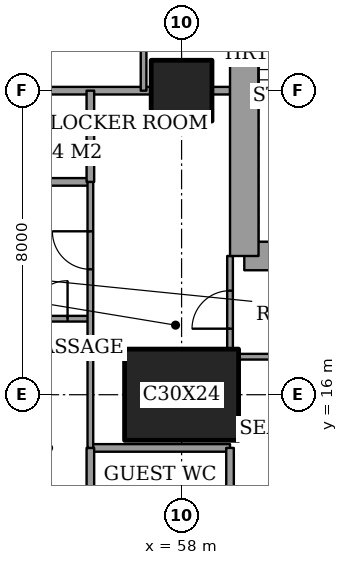
"""IFC4 building model, lengths in metres.
Left out: names, types, materials, properties, quantities, classifications, styles, units other than length and angle.
Written with IfcOpenShell. Run it as: python <this file> out.ifc"""

import sys

from ifc_helpers import new_model, si_unit, direction, frame, frame_2d, origin, origin_2d, place, context, subcontext, project, spatial, rectangle, extrude, element, fill, save


model = new_model("IFC4")
c1 = context("Model", 3, precision=1e-05, world=origin(), true_north=direction((0.0, 1.0)))
c2 = subcontext(c1, "Body", "Model", "MODEL_VIEW")
j1 = project(units=[si_unit("LENGTHUNIT", "METRE"), si_unit("PLANEANGLEUNIT", "RADIAN")], contexts=[c1])
p1 = place(None, origin())
s1 = spatial("IfcSite", under=j1, at=p1, CompositionType="ELEMENT")
p2 = place(p1, origin())
s2 = spatial("IfcBuilding", under=s1, at=p2, CompositionType="ELEMENT")
p3 = place(p2, frame((0.0, 0.0, 252.0)))
s3 = spatial("IfcBuildingStorey", under=s2, at=p3, CompositionType="ELEMENT", Elevation=252.0)
p4 = place(p3, frame((58.0, 16.0, 0.0), z_axis=(0.0, 0.0, 1.0), x_axis=(1.0, 0.0, 0.0)))
e1 = element("IfcColumn", 1, at=p4, inside=s3, PredefinedType="COLUMN", context=c2, shape_type="SweptSolid", body=[
    extrude(rectangle(XDim=3.0, YDim=2.4, at=origin_2d()), origin(), (0.0, 0.0, 1.0), 3.6),
])
p5 = place(p3, frame((58.0, 24.0, 0.0), z_axis=(0.0, 0.0, 1.0), x_axis=(1.0, 0.0, 0.0)))
e2 = element("IfcColumn", 2, at=p5, inside=s3, PredefinedType="COLUMN", context=c2, shape_type="SweptSolid", body=[
    extrude(rectangle(XDim=1.6, YDim=1.6, at=origin_2d()), origin(), (0.0, 0.0, 1.0), 3.6),
])
p6 = place(p3, frame((59.65, 19.65, 0.0), z_axis=(0.0, 0.0, 1.0), x_axis=(1.0, 0.0, 0.0)))
e3 = element("IfcWall", 3, at=p6, inside=s3, PredefinedType="SHEAR", context=c2, shape_type="SweptSolid", body=[
    extrude(rectangle(XDim=4.45, YDim=0.75, at=frame_2d((2.225, 0.0))), origin(), (0.0, 0.0, 1.0), 3.6),
])
p7 = place(p3, frame((59.65, 28.35, 0.0), z_axis=(0.0, 0.0, 1.0), x_axis=(0.0, -1.0, 0.0)))
e4 = element("IfcWall", 4, at=p7, inside=s3, PredefinedType="SHEAR", context=c2, shape_type="SweptSolid", body=[
    extrude(rectangle(XDim=8.7, YDim=0.75, at=frame_2d((4.35, 0.0))), origin(), (0.0, 0.0, 1.0), 3.6),
])
p8 = place(p7, frame((0.975, 0.0, 0.0)))
e5 = element("IfcOpeningElement", 5, at=p8, cuts=e4, PredefinedType="OPENING", context=c2, shape_type="SweptSolid", body=[
    extrude(rectangle(XDim=1.0, YDim=2.1, at=frame_2d((0.5, 1.05))), frame((0.0, 0.385, 0.0), z_axis=(0.0, -1.0, 0.0), x_axis=(1.0, 0.0, 0.0)), (0.0, 0.0, 1.0), 0.77),
])
p9 = place(p3, frame((55.6, 14.6, 0.0), z_axis=(0.0, 0.0, 1.0), x_axis=(1.0, 0.0, 0.0)))
e6 = element("IfcWall", 6, at=p9, inside=s3, PredefinedType="PARTITIONING", context=c2, shape_type="SweptSolid", body=[
    extrude(rectangle(XDim=3.675, YDim=0.2, at=frame_2d((1.837, 0.0))), origin(), (0.0, 0.0, 1.0), 3.35),
])
p10 = place(p3, frame((59.5, 17.0, 0.0), z_axis=(0.0, 0.0, 1.0), x_axis=(1.0, 0.0, 0.0)))
e7 = element("IfcWall", 7, at=p10, inside=s3, PredefinedType="PARTITIONING", context=c2, shape_type="SweptSolid", body=[
    extrude(rectangle(XDim=6.95, YDim=0.15, at=frame_2d((3.475, 0.0))), origin(), (0.0, 0.0, 1.0), 3.35),
])
p11 = place(p3, frame((51.6, 18.0, 0.0), z_axis=(0.0, 0.0, 1.0), x_axis=(1.0, 0.0, 0.0)))
e8 = element("IfcWall", 8, at=p11, inside=s3, PredefinedType="PARTITIONING", context=c2, shape_type="SweptSolid", body=[
    extrude(rectangle(XDim=4.0, YDim=0.15, at=frame_2d((2.0, 0.0))), origin(), (0.0, 0.0, 1.0), 3.35),
])
p12 = place(p11, frame((2.4, 0.0, 0.0)))
e9 = element("IfcOpeningElement", 9, at=p12, cuts=e8, PredefinedType="OPENING", context=c2, shape_type="SweptSolid", body=[
    extrude(rectangle(XDim=1.0, YDim=2.1, at=frame_2d((0.5, 1.05))), frame((0.0, 0.085, 0.0), z_axis=(0.0, -1.0, 0.0), x_axis=(1.0, 0.0, 0.0)), (0.0, 0.0, 1.0), 0.17),
])
p13 = place(p3, frame((51.2, 21.6, 0.0), z_axis=(0.0, 0.0, 1.0), x_axis=(1.0, 0.0, 0.0)))
e10 = element("IfcWall", 10, at=p13, inside=s3, PredefinedType="PARTITIONING", context=c2, shape_type="SweptSolid", body=[
    extrude(rectangle(XDim=4.4, YDim=0.2, at=frame_2d((2.2, 0.0))), origin(), (0.0, 0.0, 1.0), 3.35),
])
p14 = place(p13, frame((1.75, 0.0, 0.0)))
e11 = element("IfcOpeningElement", 11, at=p14, cuts=e10, PredefinedType="OPENING", context=c2, shape_type="SweptSolid", body=[
    extrude(rectangle(XDim=0.9, YDim=2.1, at=frame_2d((0.45, 1.05))), frame((0.0, 0.11, 0.0), z_axis=(0.0, -1.0, 0.0), x_axis=(1.0, 0.0, 0.0)), (0.0, 0.0, 1.0), 0.22),
])
p15 = place(p3, frame((50.8, 24.0, 0.0), z_axis=(0.0, 0.0, 1.0), x_axis=(1.0, 0.0, 0.0)))
e12 = element("IfcWall", 12, at=p15, inside=s3, PredefinedType="PARTITIONING", context=c2, shape_type="SweptSolid", body=[
    extrude(rectangle(XDim=6.4, YDim=0.2, at=frame_2d((3.2, 0.0))), origin(), (0.0, 0.0, 1.0), 3.35),
])
p16 = place(p3, frame((58.8, 24.0, 0.0), z_axis=(0.0, 0.0, 1.0), x_axis=(1.0, 0.0, 0.0)))
e13 = element("IfcWall", 13, at=p16, inside=s3, PredefinedType="PARTITIONING", context=c2, shape_type="SweptSolid", body=[
    extrude(rectangle(XDim=0.475, YDim=0.2, at=frame_2d((0.237, 0.0))), origin(), (0.0, 0.0, 1.0), 3.35),
])
p17 = place(p3, frame((55.6, 11.2, 0.0), z_axis=(0.0, 0.0, 1.0), x_axis=(0.0, 1.0, 0.0)))
e14 = element("IfcWall", 14, at=p17, inside=s3, PredefinedType="PARTITIONING", context=c2, shape_type="SweptSolid", body=[
    extrude(rectangle(XDim=3.4, YDim=0.2, at=frame_2d((1.7, 0.0))), origin(), (0.0, 0.0, 1.0), 3.35),
])
p18 = place(p3, frame((55.6, 21.6, 0.0), z_axis=(0.0, 0.0, 1.0), x_axis=(0.0, 1.0, 0.0)))
e15 = element("IfcWall", 15, at=p18, inside=s3, PredefinedType="PARTITIONING", context=c2, shape_type="SweptSolid", body=[
    extrude(rectangle(XDim=2.4, YDim=0.2, at=frame_2d((1.2, 0.0))), origin(), (0.0, 0.0, 1.0), 3.35),
])
p19 = place(p3, frame((55.6, 14.6, 0.0), z_axis=(0.0, 0.0, 1.0), x_axis=(0.0, 1.0, 0.0)))
e16 = element("IfcWall", 16, at=p19, inside=s3, PredefinedType="PARTITIONING", context=c2, shape_type="SweptSolid", body=[
    extrude(rectangle(XDim=7.0, YDim=0.15, at=frame_2d((3.5, 0.0))), origin(), (0.0, 0.0, 1.0), 3.35),
])
p20 = place(p19, frame((4.7, 0.0, 0.0)))
e17 = element("IfcOpeningElement", 17, at=p20, cuts=e16, PredefinedType="OPENING", context=c2, shape_type="SweptSolid", body=[
    extrude(rectangle(XDim=1.0, YDim=2.1, at=frame_2d((0.5, 1.05))), frame((0.0, 0.085, 0.0), z_axis=(0.0, -1.0, 0.0), x_axis=(1.0, 0.0, 0.0)), (0.0, 0.0, 1.0), 0.17),
])
p21 = place(p3, frame((57.0, 24.0, 0.0), z_axis=(0.0, 0.0, 1.0), x_axis=(0.0, 1.0, 0.0)))
e18 = element("IfcWall", 18, at=p21, inside=s3, PredefinedType="PARTITIONING", context=c2, shape_type="SweptSolid", body=[
    extrude(rectangle(XDim=1.6, YDim=0.15, at=frame_2d((0.8, 0.0))), origin(), (0.0, 0.0, 1.0), 3.35),
])
p22 = place(p3, frame((59.275, 11.2, 0.0), z_axis=(0.0, 0.0, 1.0), x_axis=(0.0, 1.0, 0.0)))
e19 = element("IfcWall", 19, at=p22, inside=s3, PredefinedType="PARTITIONING", context=c2, shape_type="SweptSolid", body=[
    extrude(rectangle(XDim=3.4, YDim=0.2, at=frame_2d((1.7, 0.0))), origin(), (0.0, 0.0, 1.0), 3.35),
])
p23 = place(p3, frame((59.275, 17.2, 0.0), z_axis=(0.0, 0.0, 1.0), x_axis=(0.0, 1.0, 0.0)))
e20 = element("IfcWall", 20, at=p23, inside=s3, PredefinedType="PARTITIONING", context=c2, shape_type="SweptSolid", body=[
    extrude(rectangle(XDim=2.45, YDim=0.15, at=frame_2d((1.225, 0.0))), origin(), (0.0, 0.0, 1.0), 3.35),
])
p24 = place(p23, frame((0.538, 0.0, 0.0)))
e21 = element("IfcOpeningElement", 21, at=p24, cuts=e20, PredefinedType="OPENING", context=c2, shape_type="SweptSolid", body=[
    extrude(rectangle(XDim=1.0, YDim=2.1, at=frame_2d((0.5, 1.05))), frame((0.0, 0.085, 0.0), z_axis=(0.0, -1.0, 0.0), x_axis=(1.0, 0.0, 0.0)), (0.0, 0.0, 1.0), 0.17),
])
p25 = place(p24, origin())
e22 = element("IfcDoor", 22, at=p25, inside=s3, OperationType="SINGLE_SWING_RIGHT", PredefinedType="DOOR", context=c2, shape_type="SweptSolid", body=[
    extrude(rectangle(XDim=1.0, YDim=2.1, at=frame_2d((0.5, 1.05))), frame((0.0, 0.025, 0.0), z_axis=(0.0, -1.0, 0.0), x_axis=(1.0, 0.0, 0.0)), (0.0, 0.0, 1.0), 0.05),
])
fill(e21, e22)
p26 = place(p20, origin())
e23 = element("IfcDoor", 23, at=p26, inside=s3, OperationType="SINGLE_SWING_LEFT", PredefinedType="DOOR", context=c2, shape_type="SweptSolid", body=[
    extrude(rectangle(XDim=1.0, YDim=2.1, at=frame_2d((0.5, 1.05))), frame((0.0, 0.025, 0.0), z_axis=(0.0, -1.0, 0.0), x_axis=(1.0, 0.0, 0.0)), (0.0, 0.0, 1.0), 0.05),
])
fill(e17, e23)
p27 = place(p12, origin())
e24 = element("IfcDoor", 24, at=p27, inside=s3, OperationType="SINGLE_SWING_LEFT", PredefinedType="DOOR", context=c2, shape_type="SweptSolid", body=[
    extrude(rectangle(XDim=1.0, YDim=2.1, at=frame_2d((0.5, 1.05))), frame((0.0, 0.025, 0.0), z_axis=(0.0, -1.0, 0.0), x_axis=(1.0, 0.0, 0.0)), (0.0, 0.0, 1.0), 0.05),
])
fill(e9, e24)
save(model, sys.argv[1])
